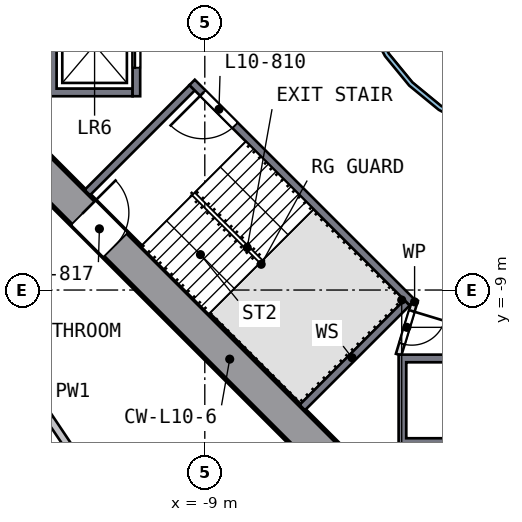
"""IFC4 building model, lengths in metres.
Left out: names, types, materials, properties, quantities, classifications, styles, units other than length and angle.
Written with IfcOpenShell. Run it as: python <this file> out.ifc"""

import sys

from ifc_helpers import new_model, si_unit, direction, frame, frame_2d, origin, place, context, subcontext, project, spatial, polyline, rectangle, outline, extrude, element, fill, save


model = new_model("IFC4")
c1 = context("Model", 3, precision=1e-05, world=origin(), true_north=direction((0.0, 1.0)))
c2 = subcontext(c1, "Body", "Model", "MODEL_VIEW")
j1 = project(units=[si_unit("LENGTHUNIT", "METRE"), si_unit("PLANEANGLEUNIT", "RADIAN")], contexts=[c1])
p1 = place(None, origin())
s1 = spatial("IfcSite", under=j1, at=p1, CompositionType="ELEMENT")
p2 = place(p1, origin())
s2 = spatial("IfcBuilding", under=s1, at=p2, CompositionType="ELEMENT")
p3 = place(p2, frame((0.0, 0.0, 49.5)))
s3 = spatial("IfcBuildingStorey", under=s2, at=p3, CompositionType="ELEMENT", Elevation=49.5)
p4 = place(p3, frame((-13.682, -5.481, 0.0), z_axis=(0.0, 0.0, 1.0), x_axis=(0.707106781, -0.707106781, 0.0)))
e1 = element("IfcWall", 1, at=p4, inside=s3, PredefinedType="SHEAR", context=c2, shape_type="SweptSolid", body=[
    extrude(rectangle(XDim=11.598, YDim=0.9, at=frame_2d((5.799, 0.0))), origin(), (0.0, 0.0, 1.0), 3.5),
])
p5 = place(p4, frame((2.099, 0.0, 0.0)))
e2 = element("IfcOpeningElement", 2, at=p5, cuts=e1, PredefinedType="OPENING", context=c2, shape_type="SweptSolid", body=[
    extrude(rectangle(XDim=1.2, YDim=2.1, at=frame_2d((0.6, 1.05))), frame((0.0, 0.46, 0.0), z_axis=(0.0, -1.0, 0.0), x_axis=(1.0, 0.0, 0.0)), (0.0, 0.0, 1.0), 0.92),
])
p6 = place(p3, origin())
e3 = element("IfcWall", 3, at=p6, inside=s3, PredefinedType="SOLIDWALL", context=c2, shape_type="SweptSolid", body=[
    extrude(outline(polyline([(-13.1, -3.9), (-13.1, -1.2), (-10.9, -1.2), (-10.9, -1.4), (-12.9, -1.4), (-12.9, -3.7), (-10.9, -3.7), (-10.9, -3.9), (-13.1, -3.9)])), origin(), (0.0, 0.0, 1.0), 3.19),
])
p7 = place(p3, frame((-10.8, -1.2, 0.0), z_axis=(0.0, 0.0, 1.0), x_axis=(0.0, -1.0, 0.0)))
e4 = element("IfcWall", 4, at=p7, inside=s3, PredefinedType="SOLIDWALL", context=c2, shape_type="SweptSolid", body=[
    extrude(rectangle(XDim=2.7, YDim=0.2, at=frame_2d((1.35, 0.0))), origin(), (0.0, 0.0, 1.0), 3.19),
])
p8 = place(p7, frame((0.75, 0.0, 0.0)))
e5 = element("IfcOpeningElement", 5, at=p8, cuts=e4, PredefinedType="OPENING", context=c2, shape_type="SweptSolid", body=[
    extrude(rectangle(XDim=1.2, YDim=2.1, at=frame_2d((0.6, 1.05))), frame((0.0, 0.11, 0.0), z_axis=(0.0, -1.0, 0.0), x_axis=(1.0, 0.0, 0.0)), (0.0, 0.0, 1.0), 0.22),
])
p9 = place(p3, origin())
e6 = element("IfcWall", 6, at=p9, inside=s3, PredefinedType="SOLIDWALL", context=c2, shape_type="SweptSolid", body=[
    extrude(outline(polyline([(-1.2, -13.1), (-3.9, -13.1), (-3.9, -10.7), (-1.2, -10.7), (-1.2, -13.1)]), holes=[polyline([(-3.7, -10.9), (-3.7, -12.9), (-1.4, -12.9), (-1.4, -10.9), (-3.7, -10.9)])]), origin(), (0.0, 0.0, 1.0), 3.19),
])
p10 = place(p3, frame((-3.535, -9.334, 0.0), z_axis=(0.0, 0.0, 1.0), x_axis=(-0.707106781, 0.707106781, 0.0)))
e7 = element("IfcWall", 7, at=p10, inside=s3, PredefinedType="SOLIDWALL", context=c2, shape_type="SweptSolid", body=[
    extrude(rectangle(XDim=8.2, YDim=0.2, at=frame_2d((4.1, 0.0))), origin(), (0.0, 0.0, 1.0), 3.19),
])
p11 = place(p10, frame((6.6, 0.0, 0.0)))
e8 = element("IfcOpeningElement", 8, at=p11, cuts=e7, PredefinedType="OPENING", context=c2, shape_type="SweptSolid", body=[
    extrude(rectangle(XDim=1.2, YDim=2.1, at=frame_2d((0.6, 1.05))), frame((0.0, 0.11, 0.0), z_axis=(0.0, -1.0, 0.0), x_axis=(1.0, 0.0, 0.0)), (0.0, 0.0, 1.0), 0.22),
])
for number, where, z_axis, x_axis in (
    (9, (-9.334, -3.677, 0.0), (0.0, 0.0, 1.0), (-0.707, -0.707, 0.0)),
    (10, (-3.677, -9.334, 0.0), (0.0, 0.0, 1.0), (-0.707, -0.707, 0.0)),
):
    element("IfcWall", number, at=place(p3, frame(where, z_axis=z_axis, x_axis=x_axis)), inside=s3, PredefinedType="SOLIDWALL", context=c2, shape_type="SweptSolid", body=[
        extrude(rectangle(XDim=3.9, YDim=0.2, at=frame_2d((1.95, 0.0))), origin(), (0.0, 0.0, 1.0), 3.19),
    ])
p12 = place(p3, frame((-3.465, -9.263, 0.0), z_axis=(0.0, 0.0, 1.0), x_axis=(-0.289808785, -0.957084567, 0.0)))
e11 = element("IfcWall", 11, at=p12, inside=s3, PredefinedType="PARTITIONING", context=c2, shape_type="SweptSolid", body=[
    extrude(rectangle(XDim=1.501, YDim=0.15, at=frame_2d((0.75, 0.0))), origin(), (0.0, 0.0, 1.0), 3.19),
])
p13 = place(p12, frame((0.301, 0.0, 0.0)))
e12 = element("IfcOpeningElement", 12, at=p13, cuts=e11, PredefinedType="OPENING", context=c2, shape_type="SweptSolid", body=[
    extrude(rectangle(XDim=0.9, YDim=2.1, at=frame_2d((0.45, 1.05))), frame((0.0, 0.085, 0.0), z_axis=(0.0, -1.0, 0.0), x_axis=(1.0, 0.0, 0.0)), (0.0, 0.0, 1.0), 0.17),
])
p14 = place(p3, origin())
e13 = element("IfcWall", 13, at=p14, inside=s3, PredefinedType="SOLIDWALL", context=c2, shape_type="SweptSolid", body=[
    extrude(outline(polyline([(5.021, -0.999), (4.73, -1.959), (4.257, -2.844), (3.62, -3.62), (2.844, -4.257), (1.959, -4.73), (0.999, -5.021), (0.0, -5.12), (-0.999, -5.021), (-1.959, -4.73), (-2.844, -4.257), (-3.62, -3.62), (-4.257, -2.844), (-4.73, -1.959), (-5.021, -0.999), (-5.12, 0.0), (-5.021, 0.999), (-4.73, 1.959), (-4.257, 2.844), (-3.62, 3.62), (-2.844, 4.257), (-1.959, 4.73), (-0.999, 5.021), (0.0, 5.12), (0.999, 5.021), (1.959, 4.73), (2.844, 4.257), (3.62, 3.62), (4.257, 2.844), (4.73, 1.959), (5.021, 0.999), (5.12, 0.0), (5.021, -0.999)]), holes=[polyline([(4.904, 0.976), (4.619, 1.913), (4.157, 2.778), (3.535, 3.535), (2.778, 4.157), (1.913, 4.619), (0.976, 4.904), (0.0, 5.0), (-0.976, 4.904), (-1.913, 4.619), (-2.778, 4.157), (-3.535, 3.535), (-4.157, 2.778), (-4.619, 1.913), (-4.904, 0.976), (-5.0, 0.0), (-4.904, -0.976), (-4.619, -1.913), (-4.157, -2.778), (-3.535, -3.535), (-2.778, -4.157), (-1.913, -4.619), (-0.976, -4.904), (0.0, -5.0), (0.976, -4.904), (1.913, -4.619), (2.778, -4.157), (3.535, -3.535), (4.157, -2.778), (4.619, -1.913), (4.904, -0.976), (5.0, 0.0), (4.904, 0.976)])]), origin(), (0.0, 0.0, 1.0), 3.19),
])
p15 = place(p3, frame((-14.137, -10.803, 0.0), z_axis=(0.0, 0.0, 1.0), x_axis=(0.556900496, -0.830579218, 0.0)))
e14 = element("IfcWall", 14, at=p15, inside=s3, PredefinedType="SOLIDWALL", context=c2, shape_type="SweptSolid", body=[
    extrude(rectangle(XDim=3.658, YDim=0.2, at=frame_2d((1.829, 0.0))), origin(), (0.0, 0.0, 1.0), 3.19),
])
p16 = place(p8, origin())
e15 = element("IfcDoor", 15, at=p16, inside=s3, OperationType="DOUBLE_DOOR_SLIDING", PredefinedType="DOOR", context=c2, shape_type="SweptSolid", body=[
    extrude(rectangle(XDim=1.2, YDim=2.1, at=frame_2d((0.6, 1.05))), frame((0.0, 0.025, 0.0), z_axis=(0.0, -1.0, 0.0), x_axis=(1.0, 0.0, 0.0)), (0.0, 0.0, 1.0), 0.05),
])
fill(e5, e15)
p17 = place(p11, origin())
e16 = element("IfcDoor", 16, at=p17, inside=s3, OperationType="SINGLE_SWING_RIGHT", PredefinedType="DOOR", context=c2, shape_type="SweptSolid", body=[
    extrude(rectangle(XDim=1.2, YDim=2.1, at=frame_2d((0.6, 1.05))), frame((0.0, 0.025, 0.0), z_axis=(0.0, -1.0, 0.0), x_axis=(1.0, 0.0, 0.0)), (0.0, 0.0, 1.0), 0.05),
])
fill(e8, e16)
p18 = place(p5, origin())
e17 = element("IfcDoor", 17, at=p18, inside=s3, OperationType="SINGLE_SWING_LEFT", PredefinedType="DOOR", context=c2, shape_type="SweptSolid", body=[
    extrude(rectangle(XDim=1.2, YDim=2.1, at=frame_2d((0.6, 1.05))), frame((0.0, 0.025, 0.0), z_axis=(0.0, -1.0, 0.0), x_axis=(1.0, 0.0, 0.0)), (0.0, 0.0, 1.0), 0.05),
])
fill(e2, e17)
p19 = place(p13, origin())
e18 = element("IfcDoor", 18, at=p19, inside=s3, OperationType="SINGLE_SWING_LEFT", PredefinedType="DOOR", context=c2, shape_type="SweptSolid", body=[
    extrude(rectangle(XDim=0.9, YDim=2.1, at=frame_2d((0.45, 1.05))), frame((0.0, 0.025, 0.0), z_axis=(0.0, -1.0, 0.0), x_axis=(1.0, 0.0, 0.0)), (0.0, 0.0, 1.0), 0.05),
])
fill(e12, e18)
save(model, sys.argv[1])
